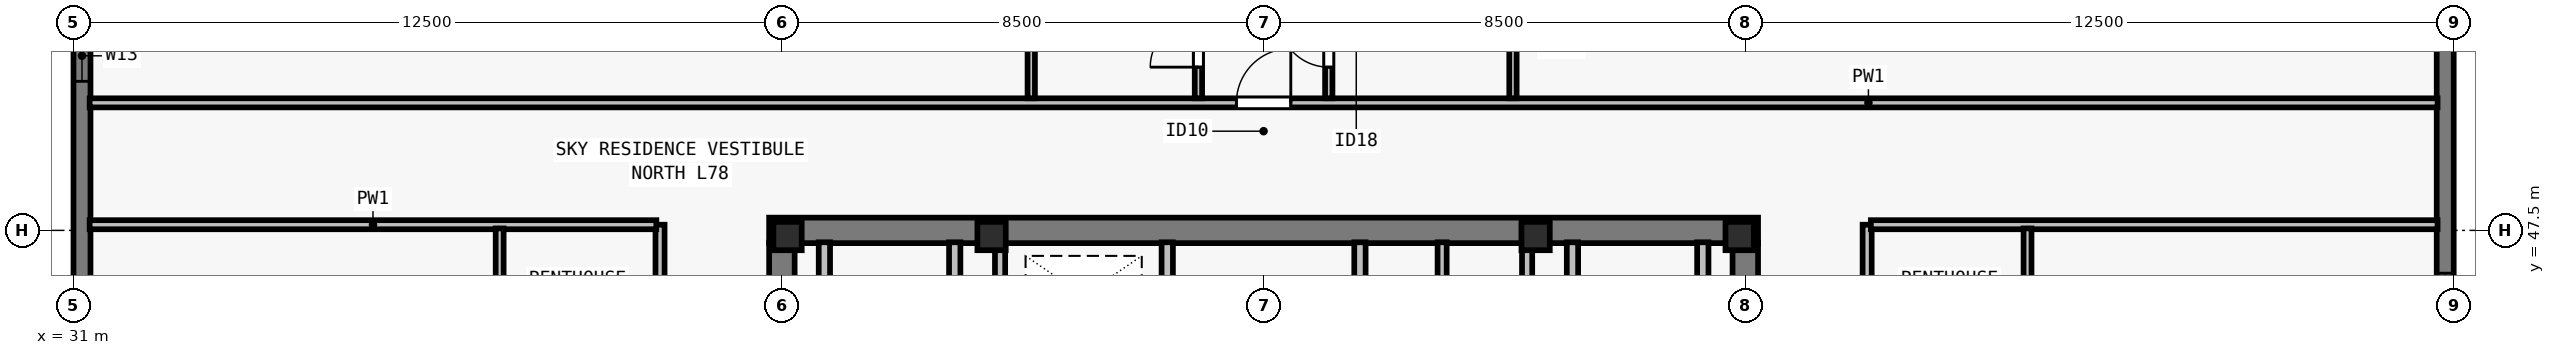
"""IFC4 building model, lengths in metres.
Left out: names, types, materials, properties, quantities, classifications, styles, units other than length and angle.
Written with IfcOpenShell. Run it as: python <this file> out.ifc"""

import sys

from ifc_helpers import new_model, si_unit, direction, frame, frame_2d, origin, origin_2d, place, context, subcontext, project, spatial, rectangle, i_section, extrude, element, fill, save


model = new_model("IFC4")
c1 = context("Model", 3, precision=1e-05, world=origin(), true_north=direction((0.0, 1.0)))
c2 = subcontext(c1, "Body", "Model", "MODEL_VIEW")
j1 = project(units=[si_unit("LENGTHUNIT", "METRE"), si_unit("PLANEANGLEUNIT", "RADIAN")], contexts=[c1])
p1 = place(None, origin())
s1 = spatial("IfcSite", under=j1, at=p1, CompositionType="ELEMENT")
p2 = place(p1, origin())
s2 = spatial("IfcBuilding", under=s1, at=p2, CompositionType="ELEMENT")
p3 = place(p2, frame((0.0, 0.0, 284.0)))
s3 = spatial("IfcBuildingStorey", under=s2, at=p3, CompositionType="ELEMENT", Elevation=284.0)
for number, where, z_axis, x_axis in (
    (1, (43.6, 47.4, 0.0), (0.0, 0.0, 1.0), (1.0, 0.0, 0.0)),
    (2, (47.2, 47.4, 0.0), (0.0, 0.0, 1.0), (1.0, 0.0, 0.0)),
    (3, (56.8, 47.4, 0.0), (0.0, 0.0, 1.0), (1.0, 0.0, 0.0)),
    (4, (60.4, 47.4, 0.0), (0.0, 0.0, 1.0), (1.0, 0.0, 0.0)),
):
    element("IfcColumn", number, at=place(p3, frame(where, z_axis=z_axis, x_axis=x_axis)), inside=s3, PredefinedType="COLUMN", context=c2, shape_type="SweptSolid", body=[
        extrude(i_section(OverallWidth=0.5, OverallDepth=0.5, WebThickness=0.028, FlangeThickness=0.045, at=origin_2d()), origin(), (0.0, 0.0, 1.0), 3.5),
    ])
p4 = place(p3, frame((31.15, 23.5, 0.0), z_axis=(0.0, 0.0, 1.0), x_axis=(0.0, 1.0, 0.0)))
e5 = element("IfcWall", 5, at=p4, inside=s3, PredefinedType="SOLIDWALL", context=c2, shape_type="SweptSolid", body=[
    extrude(rectangle(XDim=30.722, YDim=0.3, at=frame_2d((15.361, 0.0))), origin(), (0.0, 0.0, 1.0), 3.29),
])
p5 = place(p4, frame((7.756, 0.0, 0.8)))
e6 = element("IfcOpeningElement", 6, at=p5, cuts=e5, PredefinedType="OPENING", context=c2, shape_type="SweptSolid", body=[
    extrude(rectangle(XDim=2.0, YDim=1.758, at=frame_2d((1.0, 0.879))), frame((0.0, 0.16, 0.0), z_axis=(0.0, -1.0, 0.0), x_axis=(1.0, 0.0, 0.0)), (0.0, 0.0, 1.0), 0.32),
])
p6 = place(p4, frame((12.617, 0.0, 0.8)))
e7 = element("IfcOpeningElement", 7, at=p6, cuts=e5, PredefinedType="OPENING", context=c2, shape_type="SweptSolid", body=[
    extrude(rectangle(XDim=1.65, YDim=1.758, at=frame_2d((0.825, 0.879))), frame((0.0, 0.16, 0.0), z_axis=(0.0, -1.0, 0.0), x_axis=(1.0, 0.0, 0.0)), (0.0, 0.0, 1.0), 0.32),
])
p7 = place(p4, frame((17.53, 0.0, 0.8)))
e8 = element("IfcOpeningElement", 8, at=p7, cuts=e5, PredefinedType="OPENING", context=c2, shape_type="SweptSolid", body=[
    extrude(rectangle(XDim=2.0, YDim=1.758, at=frame_2d((1.0, 0.879))), frame((0.0, 0.16, 0.0), z_axis=(0.0, -1.0, 0.0), x_axis=(1.0, 0.0, 0.0)), (0.0, 0.0, 1.0), 0.32),
])
p8 = place(p4, frame((21.142, 0.0, 0.8)))
e9 = element("IfcOpeningElement", 9, at=p8, cuts=e5, PredefinedType="OPENING", context=c2, shape_type="SweptSolid", body=[
    extrude(rectangle(XDim=1.65, YDim=1.758, at=frame_2d((0.825, 0.879))), frame((0.0, 0.16, 0.0), z_axis=(0.0, -1.0, 0.0), x_axis=(1.0, 0.0, 0.0)), (0.0, 0.0, 1.0), 0.32),
])
p9 = place(p4, frame((26.63, 0.0, 0.8)))
e10 = element("IfcOpeningElement", 10, at=p9, cuts=e5, PredefinedType="OPENING", context=c2, shape_type="SweptSolid", body=[
    extrude(rectangle(XDim=0.9, YDim=1.75, at=frame_2d((0.45, 0.875))), frame((0.0, 0.16, 0.0), z_axis=(0.0, -1.0, 0.0), x_axis=(1.0, 0.0, 0.0)), (0.0, 0.0, 1.0), 0.32),
])
p10 = place(p3, frame((72.85, 54.5, 0.0), z_axis=(0.0, 0.0, 1.0), x_axis=(0.0, -1.0, 0.0)))
e11 = element("IfcWall", 11, at=p10, inside=s3, PredefinedType="SOLIDWALL", context=c2, shape_type="SweptSolid", body=[
    extrude(rectangle(XDim=30.722, YDim=0.3, at=frame_2d((15.361, 0.0))), origin(), (0.0, 0.0, 1.0), 3.29),
])
p11 = place(p10, frame((7.756, 0.0, 0.8)))
e12 = element("IfcOpeningElement", 12, at=p11, cuts=e11, PredefinedType="OPENING", context=c2, shape_type="SweptSolid", body=[
    extrude(rectangle(XDim=2.0, YDim=1.758, at=frame_2d((1.0, 0.879))), frame((0.0, 0.16, 0.0), z_axis=(0.0, -1.0, 0.0), x_axis=(1.0, 0.0, 0.0)), (0.0, 0.0, 1.0), 0.32),
])
p12 = place(p10, frame((11.768, 0.0, 0.8)))
e13 = element("IfcOpeningElement", 13, at=p12, cuts=e11, PredefinedType="OPENING", context=c2, shape_type="SweptSolid", body=[
    extrude(rectangle(XDim=1.65, YDim=1.758, at=frame_2d((0.825, 0.879))), frame((0.0, 0.16, 0.0), z_axis=(0.0, -1.0, 0.0), x_axis=(1.0, 0.0, 0.0)), (0.0, 0.0, 1.0), 0.32),
])
p13 = place(p10, frame((16.28, 0.0, 0.8)))
e14 = element("IfcOpeningElement", 14, at=p13, cuts=e11, PredefinedType="OPENING", context=c2, shape_type="SweptSolid", body=[
    extrude(rectangle(XDim=2.0, YDim=1.758, at=frame_2d((1.0, 0.879))), frame((0.0, 0.16, 0.0), z_axis=(0.0, -1.0, 0.0), x_axis=(1.0, 0.0, 0.0)), (0.0, 0.0, 1.0), 0.32),
])
p14 = place(p10, frame((21.142, 0.0, 0.8)))
e15 = element("IfcOpeningElement", 15, at=p14, cuts=e11, PredefinedType="OPENING", context=c2, shape_type="SweptSolid", body=[
    extrude(rectangle(XDim=1.65, YDim=1.758, at=frame_2d((0.825, 0.879))), frame((0.0, 0.16, 0.0), z_axis=(0.0, -1.0, 0.0), x_axis=(1.0, 0.0, 0.0)), (0.0, 0.0, 1.0), 0.32),
])
p15 = place(p3, frame((43.275, 47.5, 0.0), z_axis=(0.0, 0.0, 1.0), x_axis=(1.0, 0.0, 0.0)))
e16 = element("IfcWall", 16, at=p15, inside=s3, PredefinedType="SHEAR", context=c2, shape_type="SweptSolid", body=[
    extrude(rectangle(XDim=17.45, YDim=0.45, at=frame_2d((8.725, 0.0))), origin(), (0.0, 0.0, 1.0), 3.29),
])
for number, where, z_axis, x_axis in (
    (17, (43.5, 40.8, 0.0), (0.0, 0.0, 1.0), (0.0, 1.0, 0.0)),
    (18, (60.5, 40.8, 0.0), (0.0, 0.0, 1.0), (0.0, 1.0, 0.0)),
):
    element("IfcWall", number, at=place(p3, frame(where, z_axis=z_axis, x_axis=x_axis)), inside=s3, PredefinedType="SHEAR", context=c2, shape_type="SweptSolid", body=[
        extrude(rectangle(XDim=6.485, YDim=0.45, at=frame_2d((3.242, 0.0))), origin(), (0.0, 0.0, 1.0), 3.29),
    ])
p16 = place(p3, frame((50.3, 40.585, 0.0), z_axis=(0.0, 0.0, 1.0), x_axis=(0.0, 1.0, 0.0)))
e19 = element("IfcWall", 19, at=p16, inside=s3, PredefinedType="SOLIDWALL", context=c2, shape_type="SweptSolid", body=[
    extrude(rectangle(XDim=6.705, YDim=0.2, at=frame_2d((3.353, 0.0))), origin(), (0.0, 0.0, 1.0), 3.29),
])
p17 = place(p16, frame((0.515, 0.0, 0.0)))
e20 = element("IfcOpeningElement", 20, at=p17, cuts=e19, PredefinedType="OPENING", context=c2, shape_type="SweptSolid", body=[
    extrude(rectangle(XDim=1.1, YDim=2.2, at=frame_2d((0.55, 1.1))), frame((0.0, 0.11, 0.0), z_axis=(0.0, -1.0, 0.0), x_axis=(1.0, 0.0, 0.0)), (0.0, 0.0, 1.0), 0.22),
])
p18 = place(p16, frame((3.015, 0.0, 0.0)))
e21 = element("IfcOpeningElement", 21, at=p18, cuts=e19, PredefinedType="OPENING", context=c2, shape_type="SweptSolid", body=[
    extrude(rectangle(XDim=1.1, YDim=2.2, at=frame_2d((0.55, 1.1))), frame((0.0, 0.11, 0.0), z_axis=(0.0, -1.0, 0.0), x_axis=(1.0, 0.0, 0.0)), (0.0, 0.0, 1.0), 0.22),
])
p19 = place(p16, frame((5.065, 0.0, 0.0)))
e22 = element("IfcOpeningElement", 22, at=p19, cuts=e19, PredefinedType="OPENING", context=c2, shape_type="SweptSolid", body=[
    extrude(rectangle(XDim=0.8, YDim=2.08, at=frame_2d((0.4, 1.04))), frame((0.0, 0.11, 0.0), z_axis=(0.0, -1.0, 0.0), x_axis=(1.0, 0.0, 0.0)), (0.0, 0.0, 1.0), 0.22),
])
p20 = place(p3, frame((53.7, 40.585, 0.0), z_axis=(0.0, 0.0, 1.0), x_axis=(0.0, 1.0, 0.0)))
e23 = element("IfcWall", 23, at=p20, inside=s3, PredefinedType="SOLIDWALL", context=c2, shape_type="SweptSolid", body=[
    extrude(rectangle(XDim=6.705, YDim=0.2, at=frame_2d((3.353, 0.0))), origin(), (0.0, 0.0, 1.0), 3.29),
])
p21 = place(p20, frame((0.195, 0.0, 0.0)))
e24 = element("IfcOpeningElement", 24, at=p21, cuts=e23, PredefinedType="OPENING", context=c2, shape_type="SweptSolid", body=[
    extrude(rectangle(XDim=0.8, YDim=2.08, at=frame_2d((0.4, 1.04))), frame((0.0, 0.11, 0.0), z_axis=(0.0, -1.0, 0.0), x_axis=(1.0, 0.0, 0.0)), (0.0, 0.0, 1.0), 0.22),
])
p22 = place(p20, frame((1.865, 0.0, 0.0)))
e25 = element("IfcOpeningElement", 25, at=p22, cuts=e23, PredefinedType="OPENING", context=c2, shape_type="SweptSolid", body=[
    extrude(rectangle(XDim=1.1, YDim=2.2, at=frame_2d((0.55, 1.1))), frame((0.0, 0.11, 0.0), z_axis=(0.0, -1.0, 0.0), x_axis=(1.0, 0.0, 0.0)), (0.0, 0.0, 1.0), 0.22),
])
p23 = place(p20, frame((4.265, 0.0, 0.0)))
e26 = element("IfcOpeningElement", 26, at=p23, cuts=e23, PredefinedType="OPENING", context=c2, shape_type="SweptSolid", body=[
    extrude(rectangle(XDim=0.95, YDim=2.12, at=frame_2d((0.475, 1.06))), frame((0.0, 0.11, 0.0), z_axis=(0.0, -1.0, 0.0), x_axis=(1.0, 0.0, 0.0)), (0.0, 0.0, 1.0), 0.22),
])
for number, where, z_axis, x_axis in (
    (27, (46.55, 43.735, 0.0), (0.0, 0.0, 1.0), (0.0, 1.0, 0.0)),
    (28, (44.25, 43.735, 0.0), (0.0, 0.0, 1.0), (0.0, 1.0, 0.0)),
    (29, (57.45, 43.735, 0.0), (0.0, 0.0, 1.0), (0.0, 1.0, 0.0)),
    (30, (59.75, 43.735, 0.0), (0.0, 0.0, 1.0), (0.0, 1.0, 0.0)),
):
    element("IfcWall", number, at=place(p3, frame(where, z_axis=z_axis, x_axis=x_axis)), inside=s3, PredefinedType="SOLIDWALL", context=c2, shape_type="SweptSolid", body=[
        extrude(rectangle(XDim=3.555, YDim=0.2, at=frame_2d((1.777, 0.0))), origin(), (0.0, 0.0, 1.0), 3.29),
    ])
for number, where, z_axis, x_axis in (
    (31, (47.35, 43.735, 0.0), (0.0, 0.0, 1.0), (0.0, 1.0, 0.0)),
    (32, (56.65, 43.735, 0.0), (0.0, 0.0, 1.0), (0.0, 1.0, 0.0)),
):
    element("IfcWall", number, at=place(p3, frame(where, z_axis=z_axis, x_axis=x_axis)), inside=s3, PredefinedType="SOLIDWALL", context=c2, shape_type="SweptSolid", body=[
        extrude(rectangle(XDim=3.555, YDim=0.18, at=frame_2d((1.777, 0.0))), origin(), (0.0, 0.0, 1.0), 3.29),
    ])
p24 = place(p3, frame((55.15, 44.195, 0.0), z_axis=(0.0, 0.0, 1.0), x_axis=(0.0, 1.0, 0.0)))
e33 = element("IfcWall", 33, at=p24, inside=s3, PredefinedType="PARTITIONING", context=c2, shape_type="SweptSolid", body=[
    extrude(rectangle(XDim=3.095, YDim=0.16, at=frame_2d((1.547, 0.0))), origin(), (0.0, 0.0, 1.0), 3.29),
])
p25 = place(p24, frame((1.025, 0.0, 0.0)))
e34 = element("IfcOpeningElement", 34, at=p25, cuts=e33, PredefinedType="OPENING", context=c2, shape_type="SweptSolid", body=[
    extrude(rectangle(XDim=0.8, YDim=2.1, at=frame_2d((0.4, 1.05))), frame((0.0, 0.09, 0.0), z_axis=(0.0, -1.0, 0.0), x_axis=(1.0, 0.0, 0.0)), (0.0, 0.0, 1.0), 0.18),
])
p26 = place(p3, frame((31.285, 49.75, 0.0), z_axis=(0.0, 0.0, 1.0), x_axis=(1.0, 0.0, 0.0)))
e35 = element("IfcWall", 35, at=p26, inside=s3, PredefinedType="PARTITIONING", context=c2, shape_type="SweptSolid", body=[
    extrude(rectangle(XDim=41.43, YDim=0.16, at=frame_2d((20.715, 0.0))), origin(), (0.0, 0.0, 1.0), 3.009),
])
p27 = place(p26, frame((20.235, 0.0, 0.0)))
e36 = element("IfcOpeningElement", 36, at=p27, cuts=e35, PredefinedType="OPENING", context=c2, shape_type="SweptSolid", body=[
    extrude(rectangle(XDim=0.96, YDim=2.18, at=frame_2d((0.48, 1.09))), frame((0.0, 0.09, 0.0), z_axis=(0.0, -1.0, 0.0), x_axis=(1.0, 0.0, 0.0)), (0.0, 0.0, 1.0), 0.18),
])
p28 = place(p3, frame((41.35, 30.4, 0.0), z_axis=(0.0, 0.0, 1.0), x_axis=(0.0, 1.0, 0.0)))
e37 = element("IfcWall", 37, at=p28, inside=s3, PredefinedType="PARTITIONING", context=c2, shape_type="SweptSolid", body=[
    extrude(rectangle(XDim=17.2, YDim=0.16, at=frame_2d((8.6, 0.0))), origin(), (0.0, 0.0, 1.0), 3.009),
])
p29 = place(p28, frame((8.12, 0.0, 0.0)))
e38 = element("IfcOpeningElement", 38, at=p29, cuts=e37, PredefinedType="OPENING", context=c2, shape_type="SweptSolid", body=[
    extrude(rectangle(XDim=0.96, YDim=2.18, at=frame_2d((0.48, 1.09))), frame((0.0, 0.09, 0.0), z_axis=(0.0, -1.0, 0.0), x_axis=(1.0, 0.0, 0.0)), (0.0, 0.0, 1.0), 0.18),
])
p30 = place(p3, frame((62.65, 30.4, 0.0), z_axis=(0.0, 0.0, 1.0), x_axis=(0.0, 1.0, 0.0)))
e39 = element("IfcWall", 39, at=p30, inside=s3, PredefinedType="PARTITIONING", context=c2, shape_type="SweptSolid", body=[
    extrude(rectangle(XDim=17.2, YDim=0.16, at=frame_2d((8.6, 0.0))), origin(), (0.0, 0.0, 1.0), 3.29),
])
p31 = place(p30, frame((8.12, 0.0, 0.0)))
e40 = element("IfcOpeningElement", 40, at=p31, cuts=e39, PredefinedType="OPENING", context=c2, shape_type="SweptSolid", body=[
    extrude(rectangle(XDim=0.96, YDim=2.18, at=frame_2d((0.48, 1.09))), frame((0.0, 0.09, 0.0), z_axis=(0.0, -1.0, 0.0), x_axis=(1.0, 0.0, 0.0)), (0.0, 0.0, 1.0), 0.18),
])
for number, where, z_axis, x_axis in (
    (41, (31.285, 47.6, 0.0), (0.0, 0.0, 1.0), (1.0, 0.0, 0.0)),
    (42, (62.715, 47.6, 0.0), (0.0, 0.0, 1.0), (1.0, 0.0, 0.0)),
):
    element("IfcWall", number, at=place(p3, frame(where, z_axis=z_axis, x_axis=x_axis)), inside=s3, PredefinedType="PARTITIONING", context=c2, shape_type="SweptSolid", body=[
        extrude(rectangle(XDim=10.0, YDim=0.16, at=frame_2d((5.0, 0.0))), origin(), (0.0, 0.0, 1.0), 3.29),
    ])
p32 = place(p3, frame((47.9, 49.83, 0.0), z_axis=(0.0, 0.0, 1.0), x_axis=(0.0, 1.0, 0.0)))
e43 = element("IfcWall", 43, at=p32, inside=s3, PredefinedType="PLUMBINGWALL", context=c2, shape_type="SweptSolid", body=[
    extrude(rectangle(XDim=2.75, YDim=0.13, at=frame_2d((1.375, 0.0))), origin(), (0.0, 0.0, 1.0), 3.29),
])
p33 = place(p3, frame((50.85, 49.83, 0.0), z_axis=(0.0, 0.0, 1.0), x_axis=(0.0, 1.0, 0.0)))
e44 = element("IfcWall", 44, at=p33, inside=s3, PredefinedType="PLUMBINGWALL", context=c2, shape_type="SweptSolid", body=[
    extrude(rectangle(XDim=2.75, YDim=0.13, at=frame_2d((1.375, 0.0))), origin(), (0.0, 0.0, 1.0), 3.009),
])
p34 = place(p33, frame((0.55, 0.0, 0.0)))
e45 = element("IfcOpeningElement", 45, at=p34, cuts=e44, PredefinedType="OPENING", context=c2, shape_type="SweptSolid", body=[
    extrude(rectangle(XDim=0.85, YDim=2.08, at=frame_2d((0.425, 1.04))), frame((0.0, 0.075, 0.0), z_axis=(0.0, -1.0, 0.0), x_axis=(1.0, 0.0, 0.0)), (0.0, 0.0, 1.0), 0.15),
])
p35 = place(p3, frame((56.4, 49.83, 0.0), z_axis=(0.0, 0.0, 1.0), x_axis=(0.0, 1.0, 0.0)))
e46 = element("IfcWall", 46, at=p35, inside=s3, PredefinedType="PLUMBINGWALL", context=c2, shape_type="SweptSolid", body=[
    extrude(rectangle(XDim=2.75, YDim=0.13, at=frame_2d((1.375, 0.0))), origin(), (0.0, 0.0, 1.0), 3.29),
])
p36 = place(p3, frame((53.15, 49.83, 0.0), z_axis=(0.0, 0.0, 1.0), x_axis=(0.0, 1.0, 0.0)))
e47 = element("IfcWall", 47, at=p36, inside=s3, PredefinedType="PLUMBINGWALL", context=c2, shape_type="SweptSolid", body=[
    extrude(rectangle(XDim=2.75, YDim=0.13, at=frame_2d((1.375, 0.0))), origin(), (0.0, 0.0, 1.0), 3.29),
])
p37 = place(p36, frame((0.55, 0.0, 0.0)))
e48 = element("IfcOpeningElement", 48, at=p37, cuts=e47, PredefinedType="OPENING", context=c2, shape_type="SweptSolid", body=[
    extrude(rectangle(XDim=0.88, YDim=2.1, at=frame_2d((0.44, 1.05))), frame((0.0, 0.075, 0.0), z_axis=(0.0, -1.0, 0.0), x_axis=(1.0, 0.0, 0.0)), (0.0, 0.0, 1.0), 0.15),
])
p38 = place(p3, frame((38.52, 43.475, 0.0), z_axis=(0.0, 0.0, 1.0), x_axis=(0.0, 1.0, 0.0)))
e49 = element("IfcWall", 49, at=p38, inside=s3, PredefinedType="PARTITIONING", context=c2, shape_type="SweptSolid", body=[
    extrude(rectangle(XDim=4.06, YDim=0.14, at=frame_2d((2.03, 0.0))), origin(), (0.0, 0.0, 1.0), 3.29),
])
p39 = place(p38, frame((0.375, 0.0, 0.0)))
e50 = element("IfcOpeningElement", 50, at=p39, cuts=e49, PredefinedType="OPENING", context=c2, shape_type="SweptSolid", body=[
    extrude(rectangle(XDim=0.82, YDim=2.1, at=frame_2d((0.41, 1.05))), frame((0.0, 0.08, 0.0), z_axis=(0.0, -1.0, 0.0), x_axis=(1.0, 0.0, 0.0)), (0.0, 0.0, 1.0), 0.16),
])
p40 = place(p3, frame((65.48, 43.475, 0.0), z_axis=(0.0, 0.0, 1.0), x_axis=(0.0, 1.0, 0.0)))
e51 = element("IfcWall", 51, at=p40, inside=s3, PredefinedType="PARTITIONING", context=c2, shape_type="SweptSolid", body=[
    extrude(rectangle(XDim=4.06, YDim=0.14, at=frame_2d((2.03, 0.0))), origin(), (0.0, 0.0, 1.0), 3.29),
])
p41 = place(p40, frame((0.375, 0.0, 0.0)))
e52 = element("IfcOpeningElement", 52, at=p41, cuts=e51, PredefinedType="OPENING", context=c2, shape_type="SweptSolid", body=[
    extrude(rectangle(XDim=0.82, YDim=2.1, at=frame_2d((0.41, 1.05))), frame((0.0, 0.08, 0.0), z_axis=(0.0, -1.0, 0.0), x_axis=(1.0, 0.0, 0.0)), (0.0, 0.0, 1.0), 0.16),
])
p42 = place(p11, origin())
e53 = element("IfcWindow", 53, at=p42, inside=s3, PartitioningType="SINGLE_PANEL", PredefinedType="WINDOW", context=c2, shape_type="SweptSolid", body=[
    extrude(rectangle(XDim=2.0, YDim=1.758, at=frame_2d((1.0, 0.879))), frame((0.0, -0.05, 0.0), z_axis=(0.0, -1.0, 0.0), x_axis=(1.0, 0.0, 0.0)), (0.0, 0.0, 1.0), 0.06),
])
fill(e12, e53)
p43 = place(p9, origin())
e54 = element("IfcWindow", 54, at=p43, inside=s3, PartitioningType="SINGLE_PANEL", PredefinedType="WINDOW", context=c2, shape_type="SweptSolid", body=[
    extrude(rectangle(XDim=0.9, YDim=1.75, at=frame_2d((0.45, 0.875))), frame((0.0, -0.04, 0.0), z_axis=(0.0, -1.0, 0.0), x_axis=(1.0, 0.0, 0.0)), (0.0, 0.0, 1.0), 0.06),
])
fill(e10, e54)
p44 = place(p34, origin())
e55 = element("IfcDoor", 55, at=p44, inside=s3, OperationType="SINGLE_SWING_LEFT", PredefinedType="DOOR", context=c2, shape_type="SweptSolid", body=[
    extrude(rectangle(XDim=0.85, YDim=2.08, at=frame_2d((0.425, 1.04))), frame((0.0, 0.025, 0.0), z_axis=(0.0, -1.0, 0.0), x_axis=(1.0, 0.0, 0.0)), (0.0, 0.0, 1.0), 0.05),
])
fill(e45, e55)
p45 = place(p37, origin())
e56 = element("IfcDoor", 56, at=p45, inside=s3, OperationType="SINGLE_SWING_RIGHT", PredefinedType="DOOR", context=c2, shape_type="SweptSolid", body=[
    extrude(rectangle(XDim=0.88, YDim=2.1, at=frame_2d((0.44, 1.05))), frame((0.0, 0.025, 0.0), z_axis=(0.0, -1.0, 0.0), x_axis=(1.0, 0.0, 0.0)), (0.0, 0.0, 1.0), 0.05),
])
fill(e48, e56)
p46 = place(p27, origin())
e57 = element("IfcDoor", 57, at=p46, inside=s3, OperationType="SINGLE_SWING_RIGHT", PredefinedType="DOOR", context=c2, shape_type="SweptSolid", body=[
    extrude(rectangle(XDim=0.96, YDim=2.18, at=frame_2d((0.48, 1.09))), frame((0.0, 0.025, 0.0), z_axis=(0.0, -1.0, 0.0), x_axis=(1.0, 0.0, 0.0)), (0.0, 0.0, 1.0), 0.05),
])
fill(e36, e57)
save(model, sys.argv[1])
